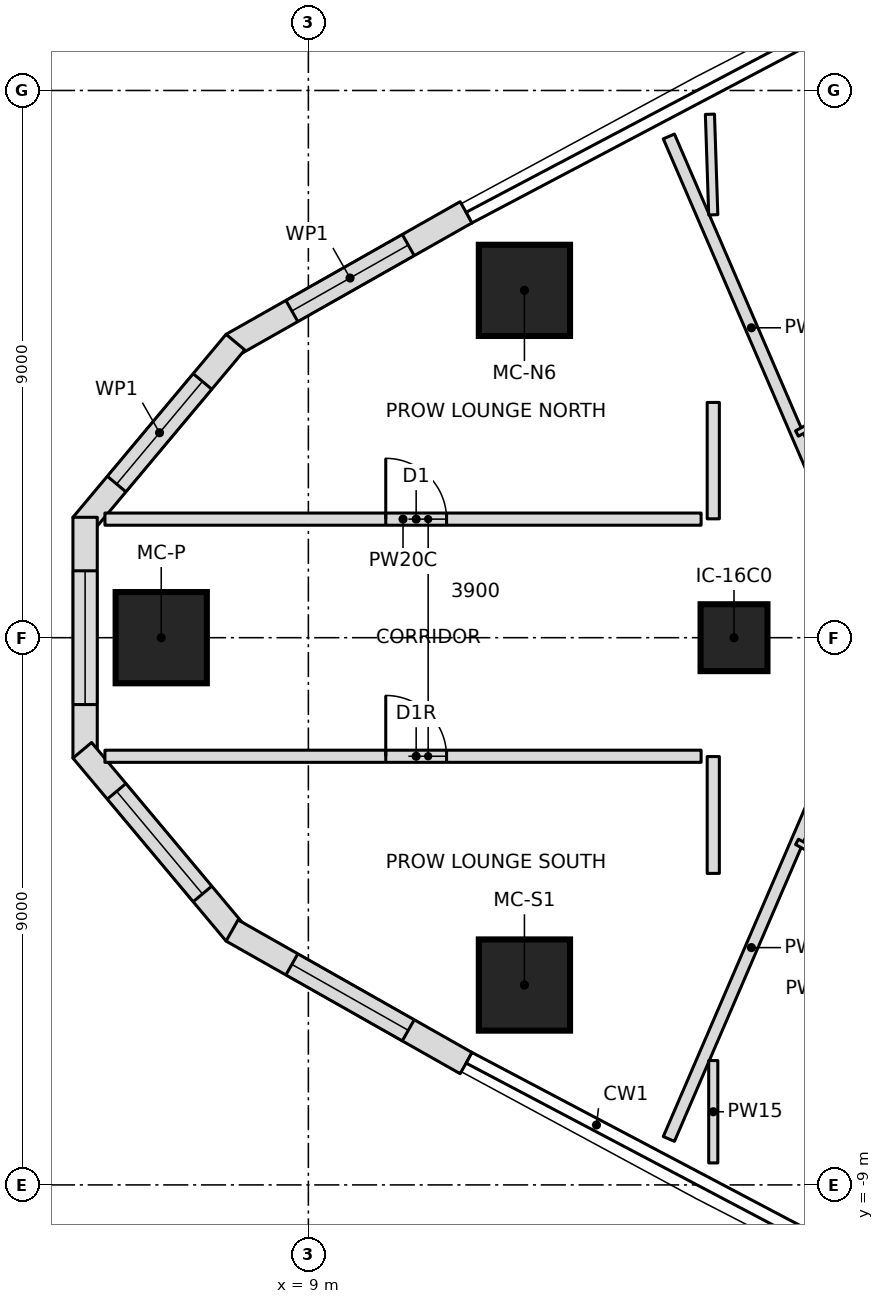
"""IFC4 building model, lengths in metres.
Left out: names, types, materials, properties, quantities, classifications, styles, units other than length and angle.
Written with IfcOpenShell. Run it as: python <this file> out.ifc"""

import sys

from ifc_helpers import new_model, si_unit, direction, frame, frame_2d, origin, origin_2d, place, context, subcontext, project, spatial, polyline, rectangle, outline, extrude, element, fill, save


model = new_model("IFC4")
c1 = context("Model", 3, precision=1e-05, world=origin(), true_north=direction((0.0, 1.0)))
c2 = subcontext(c1, "Body", "Model", "MODEL_VIEW")
j1 = project(units=[si_unit("LENGTHUNIT", "METRE"), si_unit("PLANEANGLEUNIT", "RADIAN")], contexts=[c1])
p1 = place(None, origin())
s1 = spatial("IfcSite", under=j1, at=p1, CompositionType="ELEMENT")
p2 = place(p1, origin())
s2 = spatial("IfcBuilding", under=s1, at=p2, CompositionType="ELEMENT")
p3 = place(p2, frame((0.0, 0.0, 151.5)))
s3 = spatial("IfcBuildingStorey", under=s2, at=p3, CompositionType="ELEMENT", Elevation=151.5)
for number, where, z_axis, x_axis in (
    (1, (6.58, 0.0, 0.0), (0.0, 0.0, 1.0), (1.0, 0.0, 0.0)),
    (2, (12.553, -5.713, 0.0), (0.0, 0.0, 1.0), (1.0, 0.0, 0.0)),
    (3, (12.553, 5.713, 0.0), (0.0, 0.0, 1.0), (1.0, 0.0, 0.0)),
):
    element("IfcColumn", number, at=place(p3, frame(where, z_axis=z_axis, x_axis=x_axis)), inside=s3, PredefinedType="COLUMN", context=c2, shape_type="SweptSolid", body=[
        extrude(rectangle(XDim=1.5, YDim=1.5, at=origin_2d()), origin(), (0.0, 0.0, 1.0), 3.55),
    ])
p4 = place(p3, frame((16.0, 0.0, 0.0), z_axis=(0.0, 0.0, 1.0), x_axis=(1.0, 0.0, 0.0)))
e4 = element("IfcColumn", 4, at=p4, inside=s3, PredefinedType="COLUMN", context=c2, shape_type="SweptSolid", body=[
    extrude(rectangle(XDim=1.1, YDim=1.1, at=origin_2d()), origin(), (0.0, 0.0, 1.0), 3.55),
])
p5 = place(p3, frame((11.594, 6.997, 0.0), z_axis=(0.0, 0.0, 1.0), x_axis=(-0.870045255208, -0.492971859125, 0.0)))
e5 = element("IfcWall", 5, at=p5, inside=s3, PredefinedType="NOTDEFINED", context=c2, shape_type="SweptSolid", body=[
    extrude(outline(polyline([(0.0, -0.2), (4.424, -0.2), (4.352, 0.2), (0.0, 0.2), (0.0, -0.2)])), origin(), (0.0, 0.0, 1.0), 3.25),
])
p6 = place(p5, frame((1.094, 0.0, 0.6)))
e6 = element("IfcOpeningElement", 6, at=p6, cuts=e5, PredefinedType="OPENING", context=c2, shape_type="SweptSolid", body=[
    extrude(outline(polyline([(0.0, 1.35), (0.084, 1.771), (0.322, 2.128), (0.679, 2.366), (1.1, 2.45), (1.521, 2.366), (1.878, 2.128), (2.116, 1.771), (2.2, 1.35), (2.2, 1.1), (2.116, 0.679), (1.878, 0.322), (1.521, 0.084), (1.1, 0.0), (0.679, 0.084), (0.322, 0.322), (0.084, 0.679), (0.0, 1.1), (0.0, 1.35)])), frame((0.0, 0.21, 0.0), z_axis=(0.0, -1.0, 0.0), x_axis=(1.0, 0.0, 0.0)), (0.0, 0.0, 1.0), 0.42),
])
p7 = place(p3, frame((7.777, 4.834, 0.0), z_axis=(0.0, 0.0, 1.0), x_axis=(-0.641787918235, -0.766882173484, 0.0)))
e7 = element("IfcWall", 7, at=p7, inside=s3, PredefinedType="NOTDEFINED", context=c2, shape_type="SweptSolid", body=[
    extrude(outline(polyline([(-0.036, -0.2), (3.888, -0.2), (3.743, 0.2), (0.036, 0.2), (-0.036, -0.2)])), origin(), (0.0, 0.0, 1.0), 3.25),
])
p8 = place(p7, frame((0.808, 0.0, 0.6)))
e8 = element("IfcOpeningElement", 8, at=p8, cuts=e7, PredefinedType="OPENING", context=c2, shape_type="SweptSolid", body=[
    extrude(outline(polyline([(0.0, 1.35), (0.084, 1.771), (0.322, 2.128), (0.679, 2.366), (1.1, 2.45), (1.521, 2.366), (1.878, 2.128), (2.116, 1.771), (2.2, 1.35), (2.2, 1.1), (2.116, 0.679), (1.878, 0.322), (1.521, 0.084), (1.1, 0.0), (0.679, 0.084), (0.322, 0.322), (0.084, 0.679), (0.0, 1.1), (0.0, 1.35)])), frame((0.0, 0.21, 0.0), z_axis=(0.0, -1.0, 0.0), x_axis=(1.0, 0.0, 0.0)), (0.0, 0.0, 1.0), 0.42),
])
p9 = place(p3, frame((5.328, 1.908, 0.0), z_axis=(0.0, 0.0, 1.0), x_axis=(0.0, -1.0, 0.0)))
e9 = element("IfcWall", 9, at=p9, inside=s3, PredefinedType="NOTDEFINED", context=c2, shape_type="SweptSolid", body=[
    extrude(outline(polyline([(-0.073, -0.2), (3.888, -0.2), (3.743, 0.2), (0.073, 0.2), (-0.073, -0.2)])), origin(), (0.0, 0.0, 1.0), 3.25),
])
p10 = place(p9, frame((0.808, 0.0, 0.6)))
e10 = element("IfcOpeningElement", 10, at=p10, cuts=e9, PredefinedType="OPENING", context=c2, shape_type="SweptSolid", body=[
    extrude(outline(polyline([(0.0, 1.35), (0.084, 1.771), (0.322, 2.128), (0.679, 2.366), (1.1, 2.45), (1.521, 2.366), (1.878, 2.128), (2.116, 1.771), (2.2, 1.35), (2.2, 1.1), (2.116, 0.679), (1.878, 0.322), (1.521, 0.084), (1.1, 0.0), (0.679, 0.084), (0.322, 0.322), (0.084, 0.679), (0.0, 1.1), (0.0, 1.35)])), frame((0.0, 0.21, 0.0), z_axis=(0.0, -1.0, 0.0), x_axis=(1.0, 0.0, 0.0)), (0.0, 0.0, 1.0), 0.42),
])
p11 = place(p3, frame((5.328, -1.908, 0.0), z_axis=(0.0, 0.0, 1.0), x_axis=(0.641787918235, -0.766882173484, 0.0)))
e11 = element("IfcWall", 11, at=p11, inside=s3, PredefinedType="NOTDEFINED", context=c2, shape_type="SweptSolid", body=[
    extrude(outline(polyline([(-0.073, -0.2), (3.852, -0.2), (3.779, 0.2), (0.073, 0.2), (-0.073, -0.2)])), origin(), (0.0, 0.0, 1.0), 3.25),
])
p12 = place(p11, frame((0.808, 0.0, 0.6)))
e12 = element("IfcOpeningElement", 12, at=p12, cuts=e11, PredefinedType="OPENING", context=c2, shape_type="SweptSolid", body=[
    extrude(outline(polyline([(0.0, 1.35), (0.084, 1.771), (0.322, 2.128), (0.679, 2.366), (1.1, 2.45), (1.521, 2.366), (1.878, 2.128), (2.116, 1.771), (2.2, 1.35), (2.2, 1.1), (2.116, 0.679), (1.878, 0.322), (1.521, 0.084), (1.1, 0.0), (0.679, 0.084), (0.322, 0.322), (0.084, 0.679), (0.0, 1.1), (0.0, 1.35)])), frame((0.0, 0.21, 0.0), z_axis=(0.0, -1.0, 0.0), x_axis=(1.0, 0.0, 0.0)), (0.0, 0.0, 1.0), 0.42),
])
p13 = place(p3, frame((7.777, -4.834, 0.0), z_axis=(0.0, 0.0, 1.0), x_axis=(0.870045255208, -0.492971859125, 0.0)))
e13 = element("IfcWall", 13, at=p13, inside=s3, PredefinedType="NOTDEFINED", context=c2, shape_type="SweptSolid", body=[
    extrude(outline(polyline([(-0.036, -0.2), (4.388, -0.2), (4.388, 0.2), (0.036, 0.2), (-0.036, -0.2)])), origin(), (0.0, 0.0, 1.0), 3.25),
])
p14 = place(p13, frame((1.094, 0.0, 0.6)))
e14 = element("IfcOpeningElement", 14, at=p14, cuts=e13, PredefinedType="OPENING", context=c2, shape_type="SweptSolid", body=[
    extrude(outline(polyline([(0.0, 1.35), (0.084, 1.771), (0.322, 2.128), (0.679, 2.366), (1.1, 2.45), (1.521, 2.366), (1.878, 2.128), (2.116, 1.771), (2.2, 1.35), (2.2, 1.1), (2.116, 0.679), (1.878, 0.322), (1.521, 0.084), (1.1, 0.0), (0.679, 0.084), (0.322, 0.322), (0.084, 0.679), (0.0, 1.1), (0.0, 1.35)])), frame((0.0, 0.21, 0.0), z_axis=(0.0, -1.0, 0.0), x_axis=(1.0, 0.0, 0.0)), (0.0, 0.0, 1.0), 0.42),
])
p15 = place(p3, frame((5.654, 1.95, 0.0), z_axis=(0.0, 0.0, 1.0), x_axis=(1.0, 0.0, 0.0)))
e15 = element("IfcWall", 15, at=p15, inside=s3, PredefinedType="PARTITIONING", context=c2, shape_type="SweptSolid", body=[
    extrude(rectangle(XDim=9.804, YDim=0.2, at=frame_2d((4.902, 0.0))), origin(), (0.0, 0.0, 1.0), 3.25),
])
p16 = place(p15, frame((4.618, 0.0, 0.0)))
e16 = element("IfcOpeningElement", 16, at=p16, cuts=e15, PredefinedType="OPENING", context=c2, shape_type="SweptSolid", body=[
    extrude(rectangle(XDim=1.0, YDim=2.1, at=frame_2d((0.5, 1.05))), frame((0.0, 0.11, 0.0), z_axis=(0.0, -1.0, 0.0), x_axis=(1.0, 0.0, 0.0)), (0.0, 0.0, 1.0), 0.22),
])
p17 = place(p3, frame((5.654, -1.95, 0.0), z_axis=(0.0, 0.0, 1.0), x_axis=(1.0, 0.0, 0.0)))
e17 = element("IfcWall", 17, at=p17, inside=s3, PredefinedType="PARTITIONING", context=c2, shape_type="SweptSolid", body=[
    extrude(rectangle(XDim=9.804, YDim=0.2, at=frame_2d((4.902, 0.0))), origin(), (0.0, 0.0, 1.0), 3.25),
])
p18 = place(p17, frame((4.618, 0.0, 0.0)))
e18 = element("IfcOpeningElement", 18, at=p18, cuts=e17, PredefinedType="OPENING", context=c2, shape_type="SweptSolid", body=[
    extrude(rectangle(XDim=1.0, YDim=2.1, at=frame_2d((0.5, 1.05))), frame((0.0, 0.11, 0.0), z_axis=(0.0, -1.0, 0.0), x_axis=(1.0, 0.0, 0.0)), (0.0, 0.0, 1.0), 0.22),
])
p19 = place(p3, frame((17.643, 1.95, 0.0), z_axis=(0.0, 0.0, 1.0), x_axis=(-0.395994543879, 0.918252863441, 0.0)))
e19 = element("IfcWall", 19, at=p19, inside=s3, PredefinedType="PARTITIONING", context=c2, shape_type="SweptSolid", body=[
    extrude(rectangle(XDim=6.854, YDim=0.2, at=frame_2d((3.427, 0.0))), origin(), (0.0, 0.0, 1.0), 3.25),
])
p20 = place(p3, frame((17.036, 3.358, 0.0), z_axis=(0.0, 0.0, 1.0), x_axis=(0.879823588489, 0.475300382009, 0.0)))
e20 = element("IfcWall", 20, at=p20, inside=s3, PredefinedType="PARTITIONING", context=c2, shape_type="SweptSolid", body=[
    extrude(rectangle(XDim=1.273, YDim=0.1, at=frame_2d((0.636, 0.0))), origin(), (0.0, 0.0, 1.0), 3.25),
])
p21 = place(p3, frame((14.929, -8.244, 0.0), z_axis=(0.0, 0.0, 1.0), x_axis=(0.395994543879, 0.918252863441, 0.0)))
e21 = element("IfcWall", 21, at=p21, inside=s3, PredefinedType="PARTITIONING", context=c2, shape_type="SweptSolid", body=[
    extrude(rectangle(XDim=6.854, YDim=0.2, at=frame_2d((3.427, 0.0))), origin(), (0.0, 0.0, 1.0), 3.25),
])
p22 = place(p3, frame((18.156, -3.963, 0.0), z_axis=(0.0, 0.0, 1.0), x_axis=(-0.879823588489, 0.475300382009, 0.0)))
e22 = element("IfcWall", 22, at=p22, inside=s3, PredefinedType="PARTITIONING", context=c2, shape_type="SweptSolid", body=[
    extrude(rectangle(XDim=1.273, YDim=0.1, at=frame_2d((0.636, 0.0))), origin(), (0.0, 0.0, 1.0), 3.25),
])
p23 = place(p3, frame((15.604, 8.609, 0.0), z_axis=(0.0, 0.0, 1.0), x_axis=(0.033196927484, -0.999448830109, 0.0)))
e23 = element("IfcWall", 23, at=p23, inside=s3, PredefinedType="PARTITIONING", context=c2, shape_type="SweptSolid", body=[
    extrude(rectangle(XDim=1.655, YDim=0.15, at=frame_2d((0.827, 0.0))), origin(), (0.0, 0.0, 1.0), 3.25),
])
p24 = place(p3, frame((15.659, -6.955, 0.0), z_axis=(0.0, 0.0, 1.0), x_axis=(0.0, -1.0, 0.0)))
e24 = element("IfcWall", 24, at=p24, inside=s3, PredefinedType="PARTITIONING", context=c2, shape_type="SweptSolid", body=[
    extrude(rectangle(XDim=1.684, YDim=0.15, at=frame_2d((0.842, 0.0))), origin(), (0.0, 0.0, 1.0), 3.25),
])
p25 = place(p3, frame((15.659, 3.869, 0.0), z_axis=(0.0, 0.0, 1.0), x_axis=(0.0, -1.0, 0.0)))
e25 = element("IfcWall", 25, at=p25, inside=s3, PredefinedType="PARTITIONING", context=c2, shape_type="SweptSolid", body=[
    extrude(rectangle(XDim=1.914, YDim=0.2, at=frame_2d((0.957, 0.0))), origin(), (0.0, 0.0, 1.0), 3.25),
])
p26 = place(p3, frame((15.659, -1.955, 0.0), z_axis=(0.0, 0.0, 1.0), x_axis=(0.0, -1.0, 0.0)))
e26 = element("IfcWall", 26, at=p26, inside=s3, PredefinedType="PARTITIONING", context=c2, shape_type="SweptSolid", body=[
    extrude(rectangle(XDim=1.922, YDim=0.2, at=frame_2d((0.961, 0.0))), origin(), (0.0, 0.0, 1.0), 3.25),
])
p27 = place(p6, origin())
e27 = element("IfcWindow", 27, at=p27, inside=s3, PartitioningType="SINGLE_PANEL", PredefinedType="WINDOW", context=c2, shape_type="SweptSolid", body=[
    extrude(outline(polyline([(0.0, 1.35), (0.084, 1.771), (0.322, 2.128), (0.679, 2.366), (1.1, 2.45), (1.521, 2.366), (1.878, 2.128), (2.116, 1.771), (2.2, 1.35), (2.2, 1.1), (2.116, 0.679), (1.878, 0.322), (1.521, 0.084), (1.1, 0.0), (0.679, 0.084), (0.322, 0.322), (0.084, 0.679), (0.0, 1.1), (0.0, 1.35)])), frame((0.0, 0.17, 0.0), z_axis=(0.0, -1.0, 0.0), x_axis=(1.0, 0.0, 0.0)), (0.0, 0.0, 1.0), 0.06),
])
fill(e6, e27)
p28 = place(p8, origin())
e28 = element("IfcWindow", 28, at=p28, inside=s3, PartitioningType="SINGLE_PANEL", PredefinedType="WINDOW", context=c2, shape_type="SweptSolid", body=[
    extrude(outline(polyline([(0.0, 1.35), (0.084, 1.771), (0.322, 2.128), (0.679, 2.366), (1.1, 2.45), (1.521, 2.366), (1.878, 2.128), (2.116, 1.771), (2.2, 1.35), (2.2, 1.1), (2.116, 0.679), (1.878, 0.322), (1.521, 0.084), (1.1, 0.0), (0.679, 0.084), (0.322, 0.322), (0.084, 0.679), (0.0, 1.1), (0.0, 1.35)])), frame((0.0, 0.17, 0.0), z_axis=(0.0, -1.0, 0.0), x_axis=(1.0, 0.0, 0.0)), (0.0, 0.0, 1.0), 0.06),
])
fill(e8, e28)
p29 = place(p10, origin())
e29 = element("IfcWindow", 29, at=p29, inside=s3, PartitioningType="SINGLE_PANEL", PredefinedType="WINDOW", context=c2, shape_type="SweptSolid", body=[
    extrude(outline(polyline([(0.0, 1.35), (0.084, 1.771), (0.322, 2.128), (0.679, 2.366), (1.1, 2.45), (1.521, 2.366), (1.878, 2.128), (2.116, 1.771), (2.2, 1.35), (2.2, 1.1), (2.116, 0.679), (1.878, 0.322), (1.521, 0.084), (1.1, 0.0), (0.679, 0.084), (0.322, 0.322), (0.084, 0.679), (0.0, 1.1), (0.0, 1.35)])), frame((0.0, 0.17, 0.0), z_axis=(0.0, -1.0, 0.0), x_axis=(1.0, 0.0, 0.0)), (0.0, 0.0, 1.0), 0.06),
])
fill(e10, e29)
p30 = place(p12, origin())
e30 = element("IfcWindow", 30, at=p30, inside=s3, PartitioningType="SINGLE_PANEL", PredefinedType="WINDOW", context=c2, shape_type="SweptSolid", body=[
    extrude(outline(polyline([(0.0, 1.35), (0.084, 1.771), (0.322, 2.128), (0.679, 2.366), (1.1, 2.45), (1.521, 2.366), (1.878, 2.128), (2.116, 1.771), (2.2, 1.35), (2.2, 1.1), (2.116, 0.679), (1.878, 0.322), (1.521, 0.084), (1.1, 0.0), (0.679, 0.084), (0.322, 0.322), (0.084, 0.679), (0.0, 1.1), (0.0, 1.35)])), frame((0.0, 0.17, 0.0), z_axis=(0.0, -1.0, 0.0), x_axis=(1.0, 0.0, 0.0)), (0.0, 0.0, 1.0), 0.06),
])
fill(e12, e30)
p31 = place(p14, origin())
e31 = element("IfcWindow", 31, at=p31, inside=s3, PartitioningType="SINGLE_PANEL", PredefinedType="WINDOW", context=c2, shape_type="SweptSolid", body=[
    extrude(outline(polyline([(0.0, 1.35), (0.084, 1.771), (0.322, 2.128), (0.679, 2.366), (1.1, 2.45), (1.521, 2.366), (1.878, 2.128), (2.116, 1.771), (2.2, 1.35), (2.2, 1.1), (2.116, 0.679), (1.878, 0.322), (1.521, 0.084), (1.1, 0.0), (0.679, 0.084), (0.322, 0.322), (0.084, 0.679), (0.0, 1.1), (0.0, 1.35)])), frame((0.0, 0.17, 0.0), z_axis=(0.0, -1.0, 0.0), x_axis=(1.0, 0.0, 0.0)), (0.0, 0.0, 1.0), 0.06),
])
fill(e14, e31)
p32 = place(p16, origin())
e32 = element("IfcDoor", 32, at=p32, inside=s3, OperationType="SINGLE_SWING_LEFT", PredefinedType="DOOR", context=c2, shape_type="SweptSolid", body=[
    extrude(rectangle(XDim=1.0, YDim=2.1, at=frame_2d((0.5, 1.05))), frame((0.0, 0.025, 0.0), z_axis=(0.0, -1.0, 0.0), x_axis=(1.0, 0.0, 0.0)), (0.0, 0.0, 1.0), 0.05),
])
fill(e16, e32)
p33 = place(p18, origin())
e33 = element("IfcDoor", 33, at=p33, inside=s3, OperationType="SINGLE_SWING_RIGHT", PredefinedType="DOOR", context=c2, shape_type="SweptSolid", body=[
    extrude(rectangle(XDim=1.0, YDim=2.1, at=frame_2d((0.5, 1.05))), frame((0.0, 0.025, 0.0), z_axis=(0.0, -1.0, 0.0), x_axis=(1.0, 0.0, 0.0)), (0.0, 0.0, 1.0), 0.05),
])
fill(e18, e33)
save(model, sys.argv[1])
